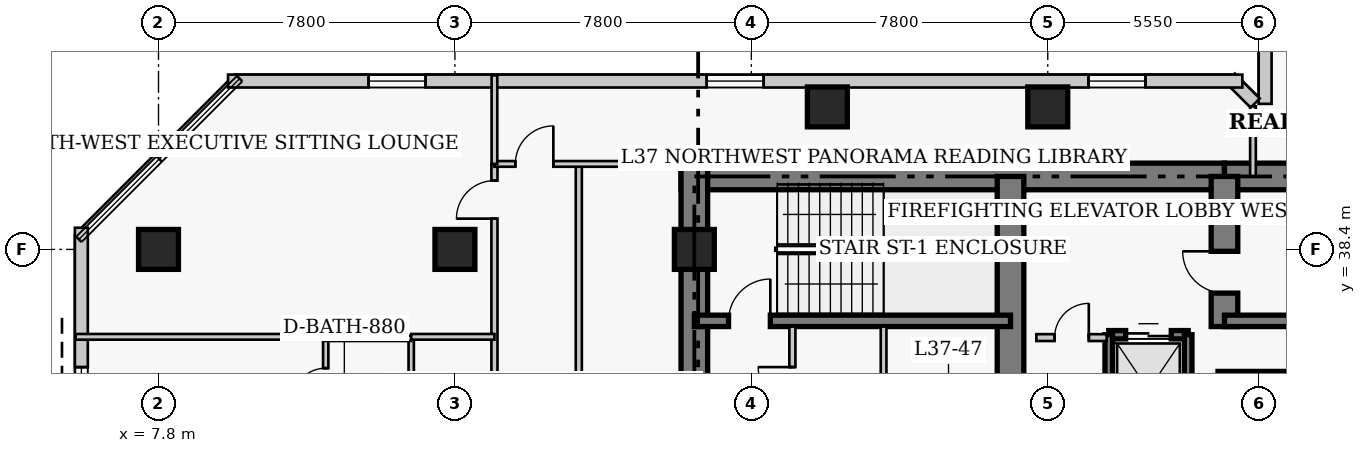
"""IFC4 building model, lengths in metres.
Left out: names, types, materials, properties, quantities, classifications, styles, units other than length and angle.
Written with IfcOpenShell. Run it as: python <this file> out.ifc"""

import sys

from ifc_helpers import new_model, si_unit, direction, frame, frame_2d, origin, origin_2d, place, context, subcontext, project, spatial, rectangle, extrude, element, fill, save


model = new_model("IFC4")
c1 = context("Model", 3, precision=1e-05, world=origin(), true_north=direction((0.0, 1.0)))
c2 = subcontext(c1, "Body", "Model", "MODEL_VIEW")
j1 = project(units=[si_unit("LENGTHUNIT", "METRE"), si_unit("PLANEANGLEUNIT", "RADIAN")], contexts=[c1])
p1 = place(None, origin())
s1 = spatial("IfcSite", under=j1, at=p1, CompositionType="ELEMENT")
p2 = place(p1, origin())
s2 = spatial("IfcBuilding", under=s1, at=p2, CompositionType="ELEMENT")
p3 = place(p2, frame((0.0, 0.0, 149.8)))
s3 = spatial("IfcBuildingStorey", under=s2, at=p3, CompositionType="ELEMENT", Elevation=149.8)
p4 = place(p3, frame((21.55, 40.32, 0.0), z_axis=(0.0, 0.0, 1.0), x_axis=(1.0, 0.0, 0.0)))
e1 = element("IfcWall", 1, at=p4, inside=s3, PredefinedType="SHEAR", context=c2, shape_type="SweptSolid", body=[
    extrude(rectangle(XDim=14.3, YDim=0.7, at=frame_2d((7.15, 0.0))), origin(), (0.0, 0.0, 1.0), 3.8),
])
p5 = place(p3, frame((35.85, 40.32, 0.0), z_axis=(0.0, 0.0, 1.0), x_axis=(1.0, 0.0, 0.0)))
e2 = element("IfcWall", 2, at=p5, inside=s3, PredefinedType="SHEAR", context=c2, shape_type="SweptSolid", body=[
    extrude(rectangle(XDim=12.6, YDim=0.7, at=frame_2d((6.3, 0.0))), origin(), (0.0, 0.0, 1.0), 3.8),
])
p6 = place(p3, frame((21.9, 27.05, 0.0), z_axis=(0.0, 0.0, 1.0), x_axis=(0.0, 1.0, 0.0)))
e3 = element("IfcWall", 3, at=p6, inside=s3, PredefinedType="SHEAR", context=c2, shape_type="SweptSolid", body=[
    extrude(rectangle(XDim=13.62, YDim=0.7, at=frame_2d((6.81, 0.0))), origin(), (0.0, 0.0, 1.0), 3.8),
])
p7 = place(p3, frame((30.22, 33.1, 0.0), z_axis=(0.0, 0.0, 1.0), x_axis=(0.0, 1.0, 0.0)))
e4 = element("IfcWall", 4, at=p7, inside=s3, PredefinedType="SHEAR", context=c2, shape_type="SweptSolid", body=[
    extrude(rectangle(XDim=7.22, YDim=0.7, at=frame_2d((3.61, 0.0))), origin(), (0.0, 0.0, 1.0), 3.8),
])
p8 = place(p3, frame((35.85, 36.37, 0.0), z_axis=(0.0, 0.0, 1.0), x_axis=(0.0, 1.0, 0.0)))
e5 = element("IfcWall", 5, at=p8, inside=s3, PredefinedType="SHEAR", context=c2, shape_type="SweptSolid", body=[
    extrude(rectangle(XDim=3.95, YDim=0.7, at=frame_2d((1.975, 0.0))), origin(), (0.0, 0.0, 1.0), 3.8),
])
p9 = place(p8, frame((0.88, 0.0, 0.0)))
e6 = element("IfcOpeningElement", 6, at=p9, cuts=e5, PredefinedType="OPENING", context=c2, shape_type="SweptSolid", body=[
    extrude(rectangle(XDim=1.1, YDim=2.15, at=frame_2d((0.55, 1.075))), frame((0.0, 0.36, 0.0), z_axis=(0.0, -1.0, 0.0), x_axis=(1.0, 0.0, 0.0)), (0.0, 0.0, 1.0), 0.72),
])
p10 = place(p3, frame((21.9, 36.52, 0.0), z_axis=(0.0, 0.0, 1.0), x_axis=(1.0, 0.0, 0.0)))
e7 = element("IfcWall", 7, at=p10, inside=s3, PredefinedType="SHEAR", context=c2, shape_type="SweptSolid", body=[
    extrude(rectangle(XDim=8.32, YDim=0.3, at=frame_2d((4.16, 0.0))), origin(), (0.0, 0.0, 1.0), 3.8),
])
p11 = place(p10, frame((0.9, 0.0, 0.0)))
e8 = element("IfcOpeningElement", 8, at=p11, cuts=e7, PredefinedType="OPENING", context=c2, shape_type="SweptSolid", body=[
    extrude(rectangle(XDim=1.1, YDim=2.15, at=frame_2d((0.55, 1.075))), frame((0.0, 0.16, 0.0), z_axis=(0.0, -1.0, 0.0), x_axis=(1.0, 0.0, 0.0)), (0.0, 0.0, 1.0), 0.32),
])
p12 = place(p3, frame((35.85, 36.52, 0.0), z_axis=(0.0, 0.0, 1.0), x_axis=(1.0, 0.0, 0.0)))
e9 = element("IfcWall", 9, at=p12, inside=s3, PredefinedType="SHEAR", context=c2, shape_type="SweptSolid", body=[
    extrude(rectangle(XDim=8.33, YDim=0.3, at=frame_2d((4.165, 0.0))), origin(), (0.0, 0.0, 1.0), 3.8),
])
for number, where, z_axis, x_axis in (
    (10, (7.8, 38.4, 0.0), (0.0, 0.0, 1.0), (1.0, 0.0, 0.0)),
    (11, (15.6, 38.4, 0.0), (0.0, 0.0, 1.0), (1.0, 0.0, 0.0)),
    (12, (21.9, 38.4, 0.0), (0.0, 0.0, 1.0), (1.0, 0.0, 0.0)),
    (13, (25.4, 42.15, 0.0), (0.0, 0.0, 1.0), (1.0, 0.0, 0.0)),
    (14, (31.2, 42.15, 0.0), (0.0, 0.0, 1.0), (1.0, 0.0, 0.0)),
):
    element("IfcColumn", number, at=place(p3, frame(where, z_axis=z_axis, x_axis=x_axis)), inside=s3, PredefinedType="COLUMN", context=c2, shape_type="SweptSolid", body=[
        extrude(rectangle(XDim=1.05, YDim=1.05, at=origin_2d()), origin(), (0.0, 0.0, 1.0), 3.8),
    ])
p13 = place(p3, frame((36.92, 44.37, 0.0), z_axis=(0.0, 0.0, 1.0), x_axis=(0.0, -1.0, 0.0)))
e15 = element("IfcWall", 15, at=p13, inside=s3, PredefinedType="SOLIDWALL", context=c2, shape_type="SweptSolid", body=[
    extrude(rectangle(XDim=2.14, YDim=0.34, at=frame_2d((1.07, 0.0))), origin(), (0.0, 0.0, 1.0), 3.55),
])
p14 = place(p3, frame((36.658, 42.251, 0.0), z_axis=(0.0, 0.0, 1.0), x_axis=(-0.707106781187, 0.707106781187, 0.0)))
e16 = element("IfcWall", 16, at=p14, inside=s3, PredefinedType="SOLIDWALL", context=c2, shape_type="SweptSolid", body=[
    extrude(rectangle(XDim=0.929, YDim=0.34, at=frame_2d((0.464, 0.0))), origin(), (0.0, 0.0, 1.0), 3.55),
])
p15 = place(p3, frame((36.32, 42.83, 0.0), z_axis=(0.0, 0.0, 1.0), x_axis=(-1.0, 0.0, 0.0)))
e17 = element("IfcWall", 17, at=p15, inside=s3, PredefinedType="SOLIDWALL", context=c2, shape_type="SweptSolid", body=[
    extrude(rectangle(XDim=26.69, YDim=0.34, at=frame_2d((13.345, 0.0))), origin(), (0.0, 0.0, 1.0), 3.55),
])
p16 = place(p15, frame((2.548, 0.0, 0.85)))
e18 = element("IfcOpeningElement", 18, at=p16, cuts=e17, PredefinedType="OPENING", context=c2, shape_type="SweptSolid", body=[
    extrude(rectangle(XDim=1.5, YDim=1.75, at=frame_2d((0.75, 0.875))), frame((0.0, 0.18, 0.0), z_axis=(0.0, -1.0, 0.0), x_axis=(1.0, 0.0, 0.0)), (0.0, 0.0, 1.0), 0.36),
])
p17 = place(p15, frame((12.595, 0.0, 0.85)))
e19 = element("IfcOpeningElement", 19, at=p17, cuts=e17, PredefinedType="OPENING", context=c2, shape_type="SweptSolid", body=[
    extrude(rectangle(XDim=1.5, YDim=1.75, at=frame_2d((0.75, 0.875))), frame((0.0, 0.18, 0.0), z_axis=(0.0, -1.0, 0.0), x_axis=(1.0, 0.0, 0.0)), (0.0, 0.0, 1.0), 0.36),
])
p18 = place(p15, frame((21.492, 0.0, 0.85)))
e20 = element("IfcOpeningElement", 20, at=p18, cuts=e17, PredefinedType="OPENING", context=c2, shape_type="SweptSolid", body=[
    extrude(rectangle(XDim=1.5, YDim=1.75, at=frame_2d((0.75, 0.875))), frame((0.0, 0.18, 0.0), z_axis=(0.0, -1.0, 0.0), x_axis=(1.0, 0.0, 0.0)), (0.0, 0.0, 1.0), 0.36),
])
p19 = place(p3, frame((5.77, 38.97, 0.0), z_axis=(0.0, 0.0, 1.0), x_axis=(0.0, -1.0, 0.0)))
e21 = element("IfcWall", 21, at=p19, inside=s3, PredefinedType="SOLIDWALL", context=c2, shape_type="SweptSolid", body=[
    extrude(rectangle(XDim=30.14, YDim=0.34, at=frame_2d((15.07, 0.0))), origin(), (0.0, 0.0, 1.0), 3.55),
])
p20 = place(p19, frame((3.667, 0.0, 0.85)))
e22 = element("IfcOpeningElement", 22, at=p20, cuts=e21, PredefinedType="OPENING", context=c2, shape_type="SweptSolid", body=[
    extrude(rectangle(XDim=1.5, YDim=1.75, at=frame_2d((0.75, 0.875))), frame((0.0, 0.18, 0.0), z_axis=(0.0, -1.0, 0.0), x_axis=(1.0, 0.0, 0.0)), (0.0, 0.0, 1.0), 0.36),
])
p21 = place(p19, frame((10.552, 0.0, 0.85)))
e23 = element("IfcOpeningElement", 23, at=p21, cuts=e21, PredefinedType="OPENING", context=c2, shape_type="SweptSolid", body=[
    extrude(rectangle(XDim=1.5, YDim=1.75, at=frame_2d((0.75, 0.875))), frame((0.0, 0.18, 0.0), z_axis=(0.0, -1.0, 0.0), x_axis=(1.0, 0.0, 0.0)), (0.0, 0.0, 1.0), 0.36),
])
p22 = place(p19, frame((16.938, 0.0, 0.85)))
e24 = element("IfcOpeningElement", 24, at=p22, cuts=e21, PredefinedType="OPENING", context=c2, shape_type="SweptSolid", body=[
    extrude(rectangle(XDim=1.5, YDim=1.75, at=frame_2d((0.75, 0.875))), frame((0.0, 0.18, 0.0), z_axis=(0.0, -1.0, 0.0), x_axis=(1.0, 0.0, 0.0)), (0.0, 0.0, 1.0), 0.36),
])
p23 = place(p19, frame((25.623, 0.0, 0.85)))
e25 = element("IfcOpeningElement", 25, at=p23, cuts=e21, PredefinedType="OPENING", context=c2, shape_type="SweptSolid", body=[
    extrude(rectangle(XDim=1.5, YDim=1.75, at=frame_2d((0.75, 0.875))), frame((0.0, 0.18, 0.0), z_axis=(0.0, -1.0, 0.0), x_axis=(1.0, 0.0, 0.0)), (0.0, 0.0, 1.0), 0.36),
])
p24 = place(p3, frame((35.68, 35.08, 0.0), z_axis=(0.0, 0.0, 1.0), x_axis=(1.0, 0.0, 0.0)))
e26 = element("IfcWall", 26, at=p24, inside=s3, PredefinedType="SHEAR", context=c2, shape_type="SweptSolid", body=[
    extrude(rectangle(XDim=2.32, YDim=0.22, at=frame_2d((1.16, 0.0))), origin(), (0.0, 0.0, 1.0), 3.8),
])
p25 = place(p3, frame((32.805, 36.155, 0.0), z_axis=(0.0, 0.0, 1.0), x_axis=(1.0, 0.0, 0.0)))
e27 = element("IfcWall", 27, at=p25, inside=s3, PredefinedType="SHEAR", context=c2, shape_type="SweptSolid", body=[
    extrude(rectangle(XDim=2.09, YDim=0.22, at=frame_2d((1.045, 0.0))), origin(), (0.0, 0.0, 1.0), 3.8),
])
p26 = place(p25, frame((0.445, 0.0, 0.0)))
e28 = element("IfcOpeningElement", 28, at=p26, cuts=e27, PredefinedType="OPENING", context=c2, shape_type="SweptSolid", body=[
    extrude(rectangle(XDim=1.2, YDim=2.15, at=frame_2d((0.6, 1.075))), frame((0.0, 0.12, 0.0), z_axis=(0.0, -1.0, 0.0), x_axis=(1.0, 0.0, 0.0)), (0.0, 0.0, 1.0), 0.24),
])
for number, where, z_axis, x_axis in (
    (29, (32.805, 33.245, 0.0), (0.0, 0.0, 1.0), (0.0, 1.0, 0.0)),
    (30, (34.895, 33.245, 0.0), (0.0, 0.0, 1.0), (0.0, 1.0, 0.0)),
):
    element("IfcWall", number, at=place(p3, frame(where, z_axis=z_axis, x_axis=x_axis)), inside=s3, PredefinedType="SHEAR", context=c2, shape_type="SweptSolid", body=[
        extrude(rectangle(XDim=2.91, YDim=0.2, at=frame_2d((1.455, 0.0))), origin(), (0.0, 0.0, 1.0), 3.8),
    ])
p27 = place(p3, frame((30.9, 36.08, 0.0), z_axis=(0.0, 0.0, 1.0), x_axis=(1.0, 0.0, 0.0)))
e31 = element("IfcWall", 31, at=p27, inside=s3, PredefinedType="PARTITIONING", context=c2, shape_type="SweptSolid", body=[
    extrude(rectangle(XDim=1.85, YDim=0.18, at=frame_2d((0.925, 0.0))), origin(), (0.0, 0.0, 1.0), 3.55),
])
p28 = place(p27, frame((0.48, 0.0, 0.0)))
e32 = element("IfcOpeningElement", 32, at=p28, cuts=e31, PredefinedType="OPENING", context=c2, shape_type="SweptSolid", body=[
    extrude(rectangle(XDim=0.9, YDim=2.15, at=frame_2d((0.45, 1.075))), frame((0.0, 0.1, 0.0), z_axis=(0.0, -1.0, 0.0), x_axis=(1.0, 0.0, 0.0)), (0.0, 0.0, 1.0), 0.2),
])
p29 = place(p3, frame((24.48, 32.8, 0.0), z_axis=(0.0, 0.0, 1.0), x_axis=(0.0, 1.0, 0.0)))
e33 = element("IfcWall", 33, at=p29, inside=s3, PredefinedType="PARTITIONING", context=c2, shape_type="SweptSolid", body=[
    extrude(rectangle(XDim=3.57, YDim=0.16, at=frame_2d((1.785, 0.0))), origin(), (0.0, 0.0, 1.0), 3.55),
])
p30 = place(p29, frame((1.604, 0.0, 0.0)))
e34 = element("IfcOpeningElement", 34, at=p30, cuts=e33, PredefinedType="OPENING", context=c2, shape_type="SweptSolid", body=[
    extrude(rectangle(XDim=0.9, YDim=2.1, at=frame_2d((0.45, 1.05))), frame((0.0, 0.09, 0.0), z_axis=(0.0, -1.0, 0.0), x_axis=(1.0, 0.0, 0.0)), (0.0, 0.0, 1.0), 0.18),
])
p31 = place(p3, frame((26.88, 32.75, 0.0), z_axis=(0.0, 0.0, 1.0), x_axis=(0.0, 1.0, 0.0)))
e35 = element("IfcWall", 35, at=p31, inside=s3, PredefinedType="PARTITIONING", context=c2, shape_type="SweptSolid", body=[
    extrude(rectangle(XDim=3.62, YDim=0.15, at=frame_2d((1.81, 0.0))), origin(), (0.0, 0.0, 1.0), 3.55),
])
p32 = place(p3, frame((16.64, 6.85, 0.0), z_axis=(0.0, 0.0, 1.0), x_axis=(0.0, 1.0, 0.0)))
e36 = element("IfcWall", 36, at=p32, inside=s3, PredefinedType="PARTITIONING", context=c2, shape_type="SweptSolid", body=[
    extrude(rectangle(XDim=33.8, YDim=0.16, at=frame_2d((16.9, 0.0))), origin(), (0.0, 0.0, 1.0), 3.55),
])
p33 = place(p32, frame((1.7, 0.0, 0.0)))
e37 = element("IfcOpeningElement", 37, at=p33, cuts=e36, PredefinedType="OPENING", context=c2, shape_type="SweptSolid", body=[
    extrude(rectangle(XDim=0.95, YDim=2.1, at=frame_2d((0.475, 1.05))), frame((0.0, 0.09, 0.0), z_axis=(0.0, -1.0, 0.0), x_axis=(1.0, 0.0, 0.0)), (0.0, 0.0, 1.0), 0.18),
])
p34 = place(p32, frame((8.275, 0.0, 0.0)))
e38 = element("IfcOpeningElement", 38, at=p34, cuts=e36, PredefinedType="OPENING", context=c2, shape_type="SweptSolid", body=[
    extrude(rectangle(XDim=0.95, YDim=2.1, at=frame_2d((0.475, 1.05))), frame((0.0, 0.09, 0.0), z_axis=(0.0, -1.0, 0.0), x_axis=(1.0, 0.0, 0.0)), (0.0, 0.0, 1.0), 0.18),
])
p35 = place(p32, frame((17.075, 0.0, 0.0)))
e39 = element("IfcOpeningElement", 39, at=p35, cuts=e36, PredefinedType="OPENING", context=c2, shape_type="SweptSolid", body=[
    extrude(rectangle(XDim=0.95, YDim=2.1, at=frame_2d((0.475, 1.05))), frame((0.0, 0.09, 0.0), z_axis=(0.0, -1.0, 0.0), x_axis=(1.0, 0.0, 0.0)), (0.0, 0.0, 1.0), 0.18),
])
p36 = place(p32, frame((25.125, 0.0, 0.0)))
e40 = element("IfcOpeningElement", 40, at=p36, cuts=e36, PredefinedType="OPENING", context=c2, shape_type="SweptSolid", body=[
    extrude(rectangle(XDim=0.95, YDim=2.1, at=frame_2d((0.475, 1.05))), frame((0.0, 0.09, 0.0), z_axis=(0.0, -1.0, 0.0), x_axis=(1.0, 0.0, 0.0)), (0.0, 0.0, 1.0), 0.18),
])
p37 = place(p32, frame((32.36, 0.0, 0.0)))
e41 = element("IfcOpeningElement", 41, at=p37, cuts=e36, PredefinedType="OPENING", context=c2, shape_type="SweptSolid", body=[
    extrude(rectangle(XDim=1.0, YDim=2.15, at=frame_2d((0.5, 1.075))), frame((0.0, 0.09, 0.0), z_axis=(0.0, -1.0, 0.0), x_axis=(1.0, 0.0, 0.0)), (0.0, 0.0, 1.0), 0.18),
])
p38 = place(p3, frame((18.86, 35.02, 0.0), z_axis=(0.0, 0.0, 1.0), x_axis=(0.0, 1.0, 0.0)))
e42 = element("IfcWall", 42, at=p38, inside=s3, PredefinedType="PARTITIONING", context=c2, shape_type="SweptSolid", body=[
    extrude(rectangle(XDim=5.63, YDim=0.16, at=frame_2d((2.815, 0.0))), origin(), (0.0, 0.0, 1.0), 3.55),
])
p39 = place(p3, frame((16.64, 40.65, 0.0), z_axis=(0.0, 0.0, 1.0), x_axis=(1.0, 0.0, 0.0)))
e43 = element("IfcWall", 43, at=p39, inside=s3, PredefinedType="PARTITIONING", context=c2, shape_type="SweptSolid", body=[
    extrude(rectangle(XDim=5.46, YDim=0.15, at=frame_2d((2.73, 0.0))), origin(), (0.0, 0.0, 1.0), 3.55),
])
p40 = place(p39, frame((0.55, 0.0, 0.0)))
e44 = element("IfcOpeningElement", 44, at=p40, cuts=e43, PredefinedType="OPENING", context=c2, shape_type="SweptSolid", body=[
    extrude(rectangle(XDim=1.0, YDim=2.15, at=frame_2d((0.5, 1.075))), frame((0.0, 0.085, 0.0), z_axis=(0.0, -1.0, 0.0), x_axis=(1.0, 0.0, 0.0)), (0.0, 0.0, 1.0), 0.17),
])
p41 = place(p3, frame((16.64, 40.65, 0.0), z_axis=(0.0, 0.0, 1.0), x_axis=(0.0, 1.0, 0.0)))
e45 = element("IfcWall", 45, at=p41, inside=s3, PredefinedType="PARTITIONING", context=c2, shape_type="SweptSolid", body=[
    extrude(rectangle(XDim=2.33, YDim=0.15, at=frame_2d((1.165, 0.0))), origin(), (0.0, 0.0, 1.0), 3.55),
])
p42 = place(p3, frame((36.6, 40.32, 0.0), z_axis=(0.0, 0.0, 1.0), x_axis=(0.0, 1.0, 0.0)))
e46 = element("IfcWall", 46, at=p42, inside=s3, PredefinedType="PARTITIONING", context=c2, shape_type="SweptSolid", body=[
    extrude(rectangle(XDim=1.845, YDim=0.15, at=frame_2d((0.922, 0.0))), origin(), (0.0, 0.0, 1.0), 3.55),
])
p43 = place(p3, frame((12.2, 33.61, 0.0), z_axis=(0.0, 0.0, 1.0), x_axis=(0.0, 1.0, 0.0)))
e47 = element("IfcWall", 47, at=p43, inside=s3, PredefinedType="PLUMBINGWALL", context=c2, shape_type="SweptSolid", body=[
    extrude(rectangle(XDim=2.45, YDim=0.14, at=frame_2d((1.225, 0.0))), origin(), (0.0, 0.0, 1.0), 3.55),
])
p44 = place(p43, frame((0.785, 0.0, 0.0)))
e48 = element("IfcOpeningElement", 48, at=p44, cuts=e47, PredefinedType="OPENING", context=c2, shape_type="SweptSolid", body=[
    extrude(rectangle(XDim=0.88, YDim=2.05, at=frame_2d((0.44, 1.025))), frame((0.0, 0.08, 0.0), z_axis=(0.0, -1.0, 0.0), x_axis=(1.0, 0.0, 0.0)), (0.0, 0.0, 1.0), 0.16),
])
p45 = place(p3, frame((14.45, 33.61, 0.0), z_axis=(0.0, 0.0, 1.0), x_axis=(0.0, 1.0, 0.0)))
e49 = element("IfcWall", 49, at=p45, inside=s3, PredefinedType="PLUMBINGWALL", context=c2, shape_type="SweptSolid", body=[
    extrude(rectangle(XDim=2.45, YDim=0.14, at=frame_2d((1.225, 0.0))), origin(), (0.0, 0.0, 1.0), 3.55),
])
p46 = place(p3, frame((12.2, 36.06, 0.0), z_axis=(0.0, 0.0, 1.0), x_axis=(1.0, 0.0, 0.0)))
e50 = element("IfcWall", 50, at=p46, inside=s3, PredefinedType="PLUMBINGWALL", context=c2, shape_type="SweptSolid", body=[
    extrude(rectangle(XDim=2.25, YDim=0.14, at=frame_2d((1.125, 0.0))), origin(), (0.0, 0.0, 1.0), 3.55),
])
p47 = place(p3, frame((5.62, 36.1, 0.0), z_axis=(0.0, 0.0, 1.0), x_axis=(1.0, 0.0, 0.0)))
e51 = element("IfcWall", 51, at=p47, inside=s3, PredefinedType="PARTITIONING", context=c2, shape_type="SweptSolid", body=[
    extrude(rectangle(XDim=6.58, YDim=0.15, at=frame_2d((3.29, 0.0))), origin(), (0.0, 0.0, 1.0), 3.55),
])
p48 = place(p3, frame((14.45, 36.1, 0.0), z_axis=(0.0, 0.0, 1.0), x_axis=(1.0, 0.0, 0.0)))
e52 = element("IfcWall", 52, at=p48, inside=s3, PredefinedType="PARTITIONING", context=c2, shape_type="SweptSolid", body=[
    extrude(rectangle(XDim=2.19, YDim=0.15, at=frame_2d((1.095, 0.0))), origin(), (0.0, 0.0, 1.0), 3.55),
])
p49 = place(p16, origin())
e53 = element("IfcWindow", 53, at=p49, inside=s3, PartitioningType="SINGLE_PANEL", PredefinedType="WINDOW", context=c2, shape_type="SweptSolid", body=[
    extrude(rectangle(XDim=1.5, YDim=1.75, at=frame_2d((0.75, 0.875))), frame((0.0, 0.03, 0.0), z_axis=(0.0, -1.0, 0.0), x_axis=(1.0, 0.0, 0.0)), (0.0, 0.0, 1.0), 0.06),
])
fill(e18, e53)
p50 = place(p17, origin())
e54 = element("IfcWindow", 54, at=p50, inside=s3, PartitioningType="SINGLE_PANEL", PredefinedType="WINDOW", context=c2, shape_type="SweptSolid", body=[
    extrude(rectangle(XDim=1.5, YDim=1.75, at=frame_2d((0.75, 0.875))), frame((0.0, 0.03, 0.0), z_axis=(0.0, -1.0, 0.0), x_axis=(1.0, 0.0, 0.0)), (0.0, 0.0, 1.0), 0.06),
])
fill(e19, e54)
p51 = place(p18, origin())
e55 = element("IfcWindow", 55, at=p51, inside=s3, PartitioningType="SINGLE_PANEL", PredefinedType="WINDOW", context=c2, shape_type="SweptSolid", body=[
    extrude(rectangle(XDim=1.5, YDim=1.75, at=frame_2d((0.75, 0.875))), frame((0.0, 0.03, 0.0), z_axis=(0.0, -1.0, 0.0), x_axis=(1.0, 0.0, 0.0)), (0.0, 0.0, 1.0), 0.06),
])
fill(e20, e55)
p52 = place(p20, origin())
e56 = element("IfcWindow", 56, at=p52, inside=s3, PartitioningType="SINGLE_PANEL", PredefinedType="WINDOW", context=c2, shape_type="SweptSolid", body=[
    extrude(rectangle(XDim=1.5, YDim=1.75, at=frame_2d((0.75, 0.875))), frame((0.0, 0.03, 0.0), z_axis=(0.0, -1.0, 0.0), x_axis=(1.0, 0.0, 0.0)), (0.0, 0.0, 1.0), 0.06),
])
fill(e22, e56)
p53 = place(p26, origin())
e57 = element("IfcDoor", 57, at=p53, inside=s3, OperationType="DOUBLE_DOOR_SLIDING", PredefinedType="DOOR", context=c2, shape_type="SweptSolid", body=[
    extrude(rectangle(XDim=1.2, YDim=2.15, at=frame_2d((0.6, 1.075))), frame((0.0, 0.025, 0.0), z_axis=(0.0, -1.0, 0.0), x_axis=(1.0, 0.0, 0.0)), (0.0, 0.0, 1.0), 0.05),
])
fill(e28, e57)
p54 = place(p28, origin())
e58 = element("IfcDoor", 58, at=p54, inside=s3, OperationType="SINGLE_SWING_RIGHT", PredefinedType="DOOR", context=c2, shape_type="SweptSolid", body=[
    extrude(rectangle(XDim=0.9, YDim=2.15, at=frame_2d((0.45, 1.075))), frame((0.0, 0.025, 0.0), z_axis=(0.0, -1.0, 0.0), x_axis=(1.0, 0.0, 0.0)), (0.0, 0.0, 1.0), 0.05),
])
fill(e32, e58)
p55 = place(p30, origin())
e59 = element("IfcDoor", 59, at=p55, inside=s3, OperationType="SINGLE_SWING_RIGHT", PredefinedType="DOOR", context=c2, shape_type="SweptSolid", body=[
    extrude(rectangle(XDim=0.9, YDim=2.1, at=frame_2d((0.45, 1.05))), frame((0.0, 0.025, 0.0), z_axis=(0.0, -1.0, 0.0), x_axis=(1.0, 0.0, 0.0)), (0.0, 0.0, 1.0), 0.05),
])
fill(e34, e59)
p56 = place(p40, origin())
e60 = element("IfcDoor", 60, at=p56, inside=s3, OperationType="SINGLE_SWING_RIGHT", PredefinedType="DOOR", context=c2, shape_type="SweptSolid", body=[
    extrude(rectangle(XDim=1.0, YDim=2.15, at=frame_2d((0.5, 1.075))), frame((0.0, 0.025, 0.0), z_axis=(0.0, -1.0, 0.0), x_axis=(1.0, 0.0, 0.0)), (0.0, 0.0, 1.0), 0.05),
])
fill(e44, e60)
p57 = place(p44, origin())
e61 = element("IfcDoor", 61, at=p57, inside=s3, OperationType="SINGLE_SWING_LEFT", PredefinedType="DOOR", context=c2, shape_type="SweptSolid", body=[
    extrude(rectangle(XDim=0.88, YDim=2.05, at=frame_2d((0.44, 1.025))), frame((0.0, 0.025, 0.0), z_axis=(0.0, -1.0, 0.0), x_axis=(1.0, 0.0, 0.0)), (0.0, 0.0, 1.0), 0.05),
])
fill(e48, e61)
p58 = place(p37, origin())
e62 = element("IfcDoor", 62, at=p58, inside=s3, OperationType="SINGLE_SWING_LEFT", PredefinedType="DOOR", context=c2, shape_type="SweptSolid", body=[
    extrude(rectangle(XDim=1.0, YDim=2.15, at=frame_2d((0.5, 1.075))), frame((0.0, 0.025, 0.0), z_axis=(0.0, -1.0, 0.0), x_axis=(1.0, 0.0, 0.0)), (0.0, 0.0, 1.0), 0.05),
])
fill(e41, e62)
p59 = place(p11, origin())
e63 = element("IfcDoor", 63, at=p59, inside=s3, OperationType="SINGLE_SWING_RIGHT", PredefinedType="DOOR", context=c2, shape_type="SweptSolid", body=[
    extrude(rectangle(XDim=1.1, YDim=2.15, at=frame_2d((0.55, 1.075))), frame((0.0, 0.025, 0.0), z_axis=(0.0, -1.0, 0.0), x_axis=(1.0, 0.0, 0.0)), (0.0, 0.0, 1.0), 0.05),
])
fill(e8, e63)
p60 = place(p9, origin())
e64 = element("IfcDoor", 64, at=p60, inside=s3, OperationType="SINGLE_SWING_RIGHT", PredefinedType="DOOR", context=c2, shape_type="SweptSolid", body=[
    extrude(rectangle(XDim=1.1, YDim=2.15, at=frame_2d((0.55, 1.075))), frame((0.0, 0.025, 0.0), z_axis=(0.0, -1.0, 0.0), x_axis=(1.0, 0.0, 0.0)), (0.0, 0.0, 1.0), 0.05),
])
fill(e6, e64)
save(model, sys.argv[1])
